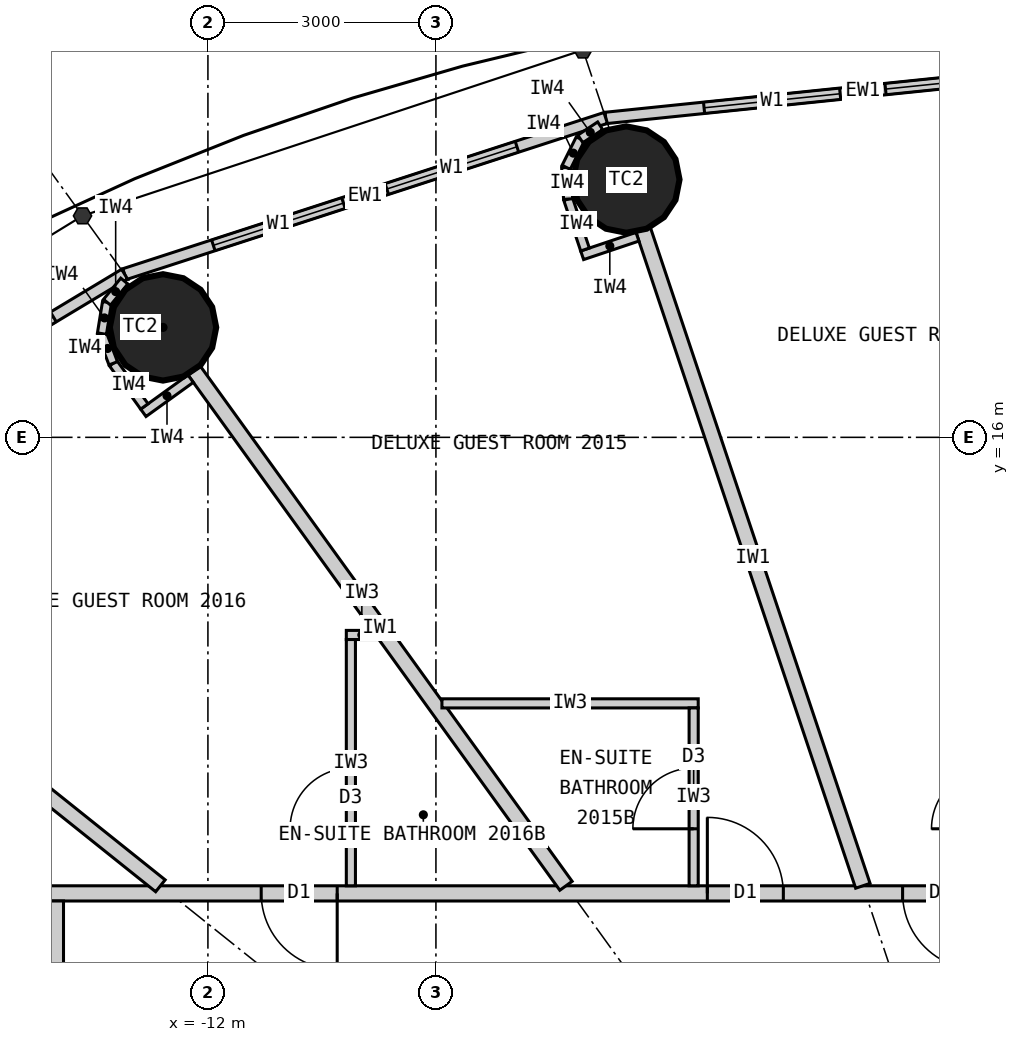
"""IFC4 building model, lengths in metres.
Left out: names, types, materials, properties, quantities, classifications, styles, units other than length and angle.
Written with IfcOpenShell. Run it as: python <this file> out.ifc"""

import sys

from ifc_helpers import new_model, si_unit, direction, frame, frame_2d, origin, origin_2d, place, context, subcontext, project, spatial, rectangle, circle, extrude, element, fill, save


model = new_model("IFC4")
c1 = context("Model", 3, precision=1e-05, world=origin(), true_north=direction((0.0, 1.0)))
c2 = subcontext(c1, "Body", "Model", "MODEL_VIEW")
j1 = project(units=[si_unit("LENGTHUNIT", "METRE"), si_unit("PLANEANGLEUNIT", "RADIAN")], contexts=[c1])
p1 = place(None, origin())
s1 = spatial("IfcSite", under=j1, at=p1, CompositionType="ELEMENT")
p2 = place(p1, origin())
s2 = spatial("IfcBuilding", under=s1, at=p2, CompositionType="ELEMENT")
p3 = place(p2, frame((0.0, 0.0, 80.4)))
s3 = spatial("IfcBuildingStorey", under=s2, at=p3, CompositionType="ELEMENT", Elevation=80.4)
for number, where, z_axis, x_axis in (
    (1, (-6.495, 19.391, 0.0), (0.0, 0.0, 1.0), (1.0, 0.0, 0.0)),
    (2, (-12.591, 17.447, 0.0), (0.0, 0.0, 1.0), (1.0, 0.0, 0.0)),
):
    element("IfcColumn", number, at=place(p3, frame(where, z_axis=z_axis, x_axis=x_axis)), inside=s3, PredefinedType="COLUMN", context=c2, shape_type="SweptSolid", body=[
        extrude(circle(Radius=0.7, at=origin_2d()), origin(), (0.0, 0.0, 1.0), 3.3),
    ])
p4 = place(p3, frame((0.0, 20.9, 0.0), z_axis=(0.0, 0.0, 1.0), x_axis=(-0.994721394369, -0.102612609291, 0.0)))
e3 = element("IfcWall", 3, at=p4, inside=s3, PredefinedType="ELEMENTEDWALL", context=c2, shape_type="SweptSolid", body=[
    extrude(rectangle(XDim=6.802, YDim=0.15, at=frame_2d((3.401, 0.0))), origin(), (0.0, 0.0, 1.0), 3.12),
])
p5 = place(p4, frame((1.301, 0.0, 0.9)))
e4 = element("IfcOpeningElement", 4, at=p5, cuts=e3, PredefinedType="OPENING", context=c2, shape_type="SweptSolid", body=[
    extrude(rectangle(XDim=1.8, YDim=1.9, at=frame_2d((0.9, 0.95))), frame((0.0, 0.085, 0.0), z_axis=(0.0, -1.0, 0.0), x_axis=(1.0, 0.0, 0.0)), (0.0, 0.0, 1.0), 0.17),
])
p6 = place(p4, frame((3.701, 0.0, 0.9)))
e5 = element("IfcOpeningElement", 5, at=p6, cuts=e3, PredefinedType="OPENING", context=c2, shape_type="SweptSolid", body=[
    extrude(rectangle(XDim=1.8, YDim=1.9, at=frame_2d((0.9, 0.95))), frame((0.0, 0.085, 0.0), z_axis=(0.0, -1.0, 0.0), x_axis=(1.0, 0.0, 0.0)), (0.0, 0.0, 1.0), 0.17),
])
p7 = place(p3, frame((-6.766, 20.202, 0.0), z_axis=(0.0, 0.0, 1.0), x_axis=(-0.951137534625, -0.308767534285, 0.0)))
e6 = element("IfcWall", 6, at=p7, inside=s3, PredefinedType="ELEMENTEDWALL", context=c2, shape_type="SweptSolid", body=[
    extrude(rectangle(XDim=6.655, YDim=0.15, at=frame_2d((3.328, 0.0))), origin(), (0.0, 0.0, 1.0), 3.12),
])
p8 = place(p7, frame((1.228, 0.0, 0.9)))
e7 = element("IfcOpeningElement", 7, at=p8, cuts=e6, PredefinedType="OPENING", context=c2, shape_type="SweptSolid", body=[
    extrude(rectangle(XDim=1.8, YDim=1.9, at=frame_2d((0.9, 0.95))), frame((0.0, 0.085, 0.0), z_axis=(0.0, -1.0, 0.0), x_axis=(1.0, 0.0, 0.0)), (0.0, 0.0, 1.0), 0.17),
])
p9 = place(p7, frame((3.628, 0.0, 0.9)))
e8 = element("IfcOpeningElement", 8, at=p9, cuts=e6, PredefinedType="OPENING", context=c2, shape_type="SweptSolid", body=[
    extrude(rectangle(XDim=1.8, YDim=1.9, at=frame_2d((0.9, 0.95))), frame((0.0, 0.085, 0.0), z_axis=(0.0, -1.0, 0.0), x_axis=(1.0, 0.0, 0.0)), (0.0, 0.0, 1.0), 0.17),
])
p10 = place(p3, frame((-13.096, 18.147, 0.0), z_axis=(0.0, 0.0, 1.0), x_axis=(-0.856983180864, -0.515344377787, 0.0)))
e9 = element("IfcWall", 9, at=p10, inside=s3, PredefinedType="ELEMENTEDWALL", context=c2, shape_type="SweptSolid", body=[
    extrude(rectangle(XDim=6.386, YDim=0.15, at=frame_2d((3.193, 0.0))), origin(), (0.0, 0.0, 1.0), 3.12),
])
p11 = place(p10, frame((1.093, 0.0, 0.9)))
e10 = element("IfcOpeningElement", 10, at=p11, cuts=e9, PredefinedType="OPENING", context=c2, shape_type="SweptSolid", body=[
    extrude(rectangle(XDim=1.8, YDim=1.9, at=frame_2d((0.9, 0.95))), frame((0.0, 0.085, 0.0), z_axis=(0.0, -1.0, 0.0), x_axis=(1.0, 0.0, 0.0)), (0.0, 0.0, 1.0), 0.17),
])
p12 = place(p10, frame((3.493, 0.0, 0.9)))
e11 = element("IfcOpeningElement", 11, at=p12, cuts=e9, PredefinedType="OPENING", context=c2, shape_type="SweptSolid", body=[
    extrude(rectangle(XDim=1.8, YDim=1.9, at=frame_2d((0.9, 0.95))), frame((0.0, 0.085, 0.0), z_axis=(0.0, -1.0, 0.0), x_axis=(1.0, 0.0, 0.0)), (0.0, 0.0, 1.0), 0.17),
])
p13 = place(p3, frame((-14.1, 10.0, 0.0), z_axis=(0.0, 0.0, 1.0), x_axis=(1.0, 0.0, 0.0)))
e12 = element("IfcWall", 12, at=p13, inside=s3, PredefinedType="PARTITIONING", context=c2, shape_type="SweptSolid", body=[
    extrude(rectangle(XDim=28.2, YDim=0.2, at=frame_2d((14.1, 0.0))), origin(), (0.0, 0.0, 1.0), 3.12),
])
p14 = place(p13, frame((23.865, 0.0, 0.0)))
e13 = element("IfcOpeningElement", 13, at=p14, cuts=e12, PredefinedType="OPENING", context=c2, shape_type="SweptSolid", body=[
    extrude(rectangle(XDim=1.0, YDim=2.2, at=frame_2d((0.5, 1.1))), frame((0.0, 0.11, 0.0), z_axis=(0.0, -1.0, 0.0), x_axis=(1.0, 0.0, 0.0)), (0.0, 0.0, 1.0), 0.22),
])
p15 = place(p13, frame((18.529, 0.0, 0.0)))
e14 = element("IfcOpeningElement", 14, at=p15, cuts=e12, PredefinedType="OPENING", context=c2, shape_type="SweptSolid", body=[
    extrude(rectangle(XDim=1.0, YDim=2.2, at=frame_2d((0.5, 1.1))), frame((0.0, 0.11, 0.0), z_axis=(0.0, -1.0, 0.0), x_axis=(1.0, 0.0, 0.0)), (0.0, 0.0, 1.0), 0.22),
])
p16 = place(p13, frame((14.623, 0.0, 0.0)))
e15 = element("IfcOpeningElement", 15, at=p16, cuts=e12, PredefinedType="OPENING", context=c2, shape_type="SweptSolid", body=[
    extrude(rectangle(XDim=1.0, YDim=2.2, at=frame_2d((0.5, 1.1))), frame((0.0, 0.11, 0.0), z_axis=(0.0, -1.0, 0.0), x_axis=(1.0, 0.0, 0.0)), (0.0, 0.0, 1.0), 0.22),
])
p17 = place(p13, frame((11.24, 0.0, 0.0)))
e16 = element("IfcOpeningElement", 16, at=p17, cuts=e12, PredefinedType="OPENING", context=c2, shape_type="SweptSolid", body=[
    extrude(rectangle(XDim=1.0, YDim=2.2, at=frame_2d((0.5, 1.1))), frame((0.0, 0.11, 0.0), z_axis=(0.0, -1.0, 0.0), x_axis=(1.0, 0.0, 0.0)), (0.0, 0.0, 1.0), 0.22),
])
p18 = place(p13, frame((8.671, 0.0, 0.0)))
e17 = element("IfcOpeningElement", 17, at=p18, cuts=e12, PredefinedType="OPENING", context=c2, shape_type="SweptSolid", body=[
    extrude(rectangle(XDim=1.0, YDim=2.2, at=frame_2d((0.5, 1.1))), frame((0.0, 0.11, 0.0), z_axis=(0.0, -1.0, 0.0), x_axis=(1.0, 0.0, 0.0)), (0.0, 0.0, 1.0), 0.22),
])
p19 = place(p13, frame((2.801, 0.0, 0.0)))
e18 = element("IfcOpeningElement", 18, at=p19, cuts=e12, PredefinedType="OPENING", context=c2, shape_type="SweptSolid", body=[
    extrude(rectangle(XDim=1.0, YDim=2.2, at=frame_2d((0.5, 1.1))), frame((0.0, 0.11, 0.0), z_axis=(0.0, -1.0, 0.0), x_axis=(1.0, 0.0, 0.0)), (0.0, 0.0, 1.0), 0.22),
])
p20 = place(p3, frame((-14.0, 9.9, 0.0), z_axis=(0.0, 0.0, 1.0), x_axis=(0.0, -1.0, 0.0)))
e19 = element("IfcWall", 19, at=p20, inside=s3, PredefinedType="PARTITIONING", context=c2, shape_type="SweptSolid", body=[
    extrude(rectangle(XDim=19.8, YDim=0.2, at=frame_2d((9.9, 0.0))), origin(), (0.0, 0.0, 1.0), 3.12),
])
p21 = place(p20, frame((7.097, 0.0, 0.0)))
e20 = element("IfcOpeningElement", 20, at=p21, cuts=e19, PredefinedType="OPENING", context=c2, shape_type="SweptSolid", body=[
    extrude(rectangle(XDim=1.0, YDim=2.2, at=frame_2d((0.5, 1.1))), frame((0.0, 0.11, 0.0), z_axis=(0.0, -1.0, 0.0), x_axis=(1.0, 0.0, 0.0)), (0.0, 0.0, 1.0), 0.22),
])
p22 = place(p20, frame((10.778, 0.0, 0.0)))
e21 = element("IfcOpeningElement", 21, at=p22, cuts=e19, PredefinedType="OPENING", context=c2, shape_type="SweptSolid", body=[
    extrude(rectangle(XDim=1.0, YDim=2.2, at=frame_2d((0.5, 1.1))), frame((0.0, 0.11, 0.0), z_axis=(0.0, -1.0, 0.0), x_axis=(1.0, 0.0, 0.0)), (0.0, 0.0, 1.0), 0.22),
])
p23 = place(p20, frame((13.552, 0.0, 0.0)))
e22 = element("IfcOpeningElement", 22, at=p23, cuts=e19, PredefinedType="OPENING", context=c2, shape_type="SweptSolid", body=[
    extrude(rectangle(XDim=1.0, YDim=2.2, at=frame_2d((0.5, 1.1))), frame((0.0, 0.11, 0.0), z_axis=(0.0, -1.0, 0.0), x_axis=(1.0, 0.0, 0.0)), (0.0, 0.0, 1.0), 0.22),
])
p24 = place(p20, frame((18.698, 0.0, 0.0)))
e23 = element("IfcOpeningElement", 23, at=p24, cuts=e19, PredefinedType="OPENING", context=c2, shape_type="SweptSolid", body=[
    extrude(rectangle(XDim=1.0, YDim=2.2, at=frame_2d((0.5, 1.1))), frame((0.0, 0.11, 0.0), z_axis=(0.0, -1.0, 0.0), x_axis=(1.0, 0.0, 0.0)), (0.0, 0.0, 1.0), 0.22),
])
p25 = place(p20, frame((1.877, 0.0, 0.0)))
e24 = element("IfcOpeningElement", 24, at=p25, cuts=e19, PredefinedType="OPENING", context=c2, shape_type="SweptSolid", body=[
    extrude(rectangle(XDim=1.0, YDim=2.2, at=frame_2d((0.5, 1.1))), frame((0.0, 0.11, 0.0), z_axis=(0.0, -1.0, 0.0), x_axis=(1.0, 0.0, 0.0)), (0.0, 0.0, 1.0), 0.22),
])
p26 = place(p3, frame((-3.383, 10.1, 0.0), z_axis=(0.0, 0.0, 1.0), x_axis=(-0.31759592231, 0.948226149256, 0.0)))
e25 = element("IfcWall", 25, at=p26, inside=s3, PredefinedType="PARTITIONING", context=c2, shape_type="SweptSolid", body=[
    extrude(rectangle(XDim=9.098, YDim=0.2, at=frame_2d((4.549, 0.0))), origin(), (0.0, 0.0, 1.0), 2.32),
])
p27 = place(p3, frame((-7.289, 10.1, 0.0), z_axis=(0.0, 0.0, 1.0), x_axis=(-0.585198353053, 0.810890182197, 0.0)))
e26 = element("IfcWall", 26, at=p27, inside=s3, PredefinedType="PARTITIONING", context=c2, shape_type="SweptSolid", body=[
    extrude(rectangle(XDim=8.36, YDim=0.2, at=frame_2d((4.18, 0.0))), origin(), (0.0, 0.0, 1.0), 2.32),
])
p28 = place(p3, frame((-12.625, 10.1, 0.0), z_axis=(0.0, 0.0, 1.0), x_axis=(-0.780892451574, 0.624665493744, 0.0)))
e27 = element("IfcWall", 27, at=p28, inside=s3, PredefinedType="PARTITIONING", context=c2, shape_type="SweptSolid", body=[
    extrude(rectangle(XDim=6.045, YDim=0.2, at=frame_2d((3.022, 0.0))), origin(), (0.0, 0.0, 1.0), 2.32),
])
p29 = place(p3, frame((-8.921, 12.5, 0.0), z_axis=(0.0, 0.0, 1.0), x_axis=(1.0, 0.0, 0.0)))
e28 = element("IfcWall", 28, at=p29, inside=s3, PredefinedType="PARTITIONING", context=c2, shape_type="SweptSolid", body=[
    extrude(rectangle(XDim=3.372, YDim=0.12, at=frame_2d((1.686, 0.0))), origin(), (0.0, 0.0, 1.0), 3.12),
])
p30 = place(p3, frame((-5.609, 10.1, 0.0), z_axis=(0.0, 0.0, 1.0), x_axis=(0.0, 1.0, 0.0)))
e29 = element("IfcWall", 29, at=p30, inside=s3, PredefinedType="PARTITIONING", context=c2, shape_type="SweptSolid", body=[
    extrude(rectangle(XDim=2.34, YDim=0.12, at=frame_2d((1.17, 0.0))), origin(), (0.0, 0.0, 1.0), 3.12),
])
p31 = place(p30, frame((0.75, 0.0, 0.0)))
e30 = element("IfcOpeningElement", 30, at=p31, cuts=e29, PredefinedType="OPENING", context=c2, shape_type="SweptSolid", body=[
    extrude(rectangle(XDim=0.8, YDim=2.1, at=frame_2d((0.4, 1.05))), frame((0.0, 0.07, 0.0), z_axis=(0.0, -1.0, 0.0), x_axis=(1.0, 0.0, 0.0)), (0.0, 0.0, 1.0), 0.14),
])
p32 = place(p3, frame((-9.771, 13.4, 0.0), z_axis=(0.0, 0.0, 1.0), x_axis=(-1.0, 0.0, 0.0)))
e31 = element("IfcWall", 31, at=p32, inside=s3, PredefinedType="PARTITIONING", context=c2, shape_type="SweptSolid", body=[
    extrude(rectangle(XDim=0.408, YDim=0.12, at=frame_2d((0.204, 0.0))), origin(), (0.0, 0.0, 1.0), 3.12),
])
p33 = place(p3, frame((-10.119, 10.1, 0.0), z_axis=(0.0, 0.0, 1.0), x_axis=(0.0, 1.0, 0.0)))
e32 = element("IfcWall", 32, at=p33, inside=s3, PredefinedType="PARTITIONING", context=c2, shape_type="SweptSolid", body=[
    extrude(rectangle(XDim=3.24, YDim=0.12, at=frame_2d((1.62, 0.0))), origin(), (0.0, 0.0, 1.0), 3.12),
])
p34 = place(p33, frame((0.75, 0.0, 0.0)))
e33 = element("IfcOpeningElement", 33, at=p34, cuts=e32, PredefinedType="OPENING", context=c2, shape_type="SweptSolid", body=[
    extrude(rectangle(XDim=0.8, YDim=2.1, at=frame_2d((0.4, 1.05))), frame((0.0, 0.07, 0.0), z_axis=(0.0, -1.0, 0.0), x_axis=(1.0, 0.0, 0.0)), (0.0, 0.0, 1.0), 0.14),
])
p35 = place(p3, frame((-6.348, 18.639, 0.0), z_axis=(0.0, 0.0, 1.0), x_axis=(-0.948268951266, -0.317468102437, 0.0)))
e34 = element("IfcWall", 34, at=p35, inside=s3, PredefinedType="PARTITIONING", context=c2, shape_type="SweptSolid", body=[
    extrude(rectangle(XDim=0.768, YDim=0.12, at=frame_2d((0.384, 0.0))), origin(), (0.0, 0.0, 1.0), 3.12),
])
p36 = place(p3, frame((-7.038, 18.471, 0.0), z_axis=(0.0, 0.0, 1.0), x_axis=(-0.317378466199, 0.9482989556, 0.0)))
e35 = element("IfcWall", 35, at=p36, inside=s3, PredefinedType="PARTITIONING", context=c2, shape_type="SweptSolid", body=[
    extrude(rectangle(XDim=0.7, YDim=0.12, at=frame_2d((0.35, 0.0))), origin(), (0.0, 0.0, 1.0), 3.12),
])
p37 = place(p3, frame((-7.26, 19.135, 0.0), z_axis=(0.0, 0.0, 1.0), x_axis=(-0.0613238046, 0.99811792439, 0.0)))
e36 = element("IfcWall", 36, at=p37, inside=s3, PredefinedType="PARTITIONING", context=c2, shape_type="SweptSolid", body=[
    extrude(rectangle(XDim=0.418, YDim=0.12, at=frame_2d((0.209, 0.0))), origin(), (0.0, 0.0, 1.0), 3.12),
])
p38 = place(p3, frame((-7.286, 19.552, 0.0), z_axis=(0.0, 0.0, 1.0), x_axis=(0.445810757773, 0.89512723579, 0.0)))
e37 = element("IfcWall", 37, at=p38, inside=s3, PredefinedType="PARTITIONING", context=c2, shape_type="SweptSolid", body=[
    extrude(rectangle(XDim=0.418, YDim=0.12, at=frame_2d((0.209, 0.0))), origin(), (0.0, 0.0, 1.0), 3.12),
])
p39 = place(p3, frame((-7.1, 19.926, 0.0), z_axis=(0.0, 0.0, 1.0), x_axis=(0.833488262509, 0.552537162787, 0.0)))
e38 = element("IfcWall", 38, at=p39, inside=s3, PredefinedType="PARTITIONING", context=c2, shape_type="SweptSolid", body=[
    extrude(rectangle(XDim=0.313, YDim=0.12, at=frame_2d((0.156, 0.0))), origin(), (0.0, 0.0, 1.0), 3.12),
])
p40 = place(p3, frame((-12.227, 16.772, 0.0), z_axis=(0.0, 0.0, 1.0), x_axis=(-0.810821798253, -0.585293098778, 0.0)))
e39 = element("IfcWall", 39, at=p40, inside=s3, PredefinedType="PARTITIONING", context=c2, shape_type="SweptSolid", body=[
    extrude(rectangle(XDim=0.768, YDim=0.12, at=frame_2d((0.384, 0.0))), origin(), (0.0, 0.0, 1.0), 3.12),
])
p41 = place(p3, frame((-12.836, 16.406, 0.0), z_axis=(0.0, 0.0, 1.0), x_axis=(-0.585223113993, 0.810872312296, 0.0)))
e40 = element("IfcWall", 40, at=p41, inside=s3, PredefinedType="PARTITIONING", context=c2, shape_type="SweptSolid", body=[
    extrude(rectangle(XDim=0.7, YDim=0.12, at=frame_2d((0.35, 0.0))), origin(), (0.0, 0.0, 1.0), 3.12),
])
p42 = place(p3, frame((-13.246, 16.974, 0.0), z_axis=(0.0, 0.0, 1.0), x_axis=(-0.355728122235, 0.934589483705, 0.0)))
e41 = element("IfcWall", 41, at=p42, inside=s3, PredefinedType="PARTITIONING", context=c2, shape_type="SweptSolid", body=[
    extrude(rectangle(XDim=0.418, YDim=0.12, at=frame_2d((0.209, 0.0))), origin(), (0.0, 0.0, 1.0), 3.12),
])
p43 = place(p3, frame((-13.394, 17.365, 0.0), z_axis=(0.0, 0.0, 1.0), x_axis=(0.159379276926, 0.987217425943, 0.0)))
e42 = element("IfcWall", 42, at=p43, inside=s3, PredefinedType="PARTITIONING", context=c2, shape_type="SweptSolid", body=[
    extrude(rectangle(XDim=0.418, YDim=0.12, at=frame_2d((0.209, 0.0))), origin(), (0.0, 0.0, 1.0), 3.12),
])
p44 = place(p3, frame((-13.328, 17.777, 0.0), z_axis=(0.0, 0.0, 1.0), x_axis=(0.632276783541, 0.774742582407, 0.0)))
e43 = element("IfcWall", 43, at=p44, inside=s3, PredefinedType="PARTITIONING", context=c2, shape_type="SweptSolid", body=[
    extrude(rectangle(XDim=0.36, YDim=0.12, at=frame_2d((0.18, 0.0))), origin(), (0.0, 0.0, 1.0), 3.12),
])
p45 = place(p5, origin())
e44 = element("IfcWindow", 44, at=p45, inside=s3, PartitioningType="SINGLE_PANEL", PredefinedType="WINDOW", context=c2, shape_type="SweptSolid", body=[
    extrude(rectangle(XDim=1.8, YDim=1.9, at=frame_2d((0.9, 0.95))), frame((0.0, 0.03, 0.0), z_axis=(0.0, -1.0, 0.0), x_axis=(1.0, 0.0, 0.0)), (0.0, 0.0, 1.0), 0.06),
])
fill(e4, e44)
p46 = place(p6, origin())
e45 = element("IfcWindow", 45, at=p46, inside=s3, PartitioningType="SINGLE_PANEL", PredefinedType="WINDOW", context=c2, shape_type="SweptSolid", body=[
    extrude(rectangle(XDim=1.8, YDim=1.9, at=frame_2d((0.9, 0.95))), frame((0.0, 0.03, 0.0), z_axis=(0.0, -1.0, 0.0), x_axis=(1.0, 0.0, 0.0)), (0.0, 0.0, 1.0), 0.06),
])
fill(e5, e45)
p47 = place(p8, origin())
e46 = element("IfcWindow", 46, at=p47, inside=s3, PartitioningType="SINGLE_PANEL", PredefinedType="WINDOW", context=c2, shape_type="SweptSolid", body=[
    extrude(rectangle(XDim=1.8, YDim=1.9, at=frame_2d((0.9, 0.95))), frame((0.0, 0.03, 0.0), z_axis=(0.0, -1.0, 0.0), x_axis=(1.0, 0.0, 0.0)), (0.0, 0.0, 1.0), 0.06),
])
fill(e7, e46)
p48 = place(p9, origin())
e47 = element("IfcWindow", 47, at=p48, inside=s3, PartitioningType="SINGLE_PANEL", PredefinedType="WINDOW", context=c2, shape_type="SweptSolid", body=[
    extrude(rectangle(XDim=1.8, YDim=1.9, at=frame_2d((0.9, 0.95))), frame((0.0, 0.03, 0.0), z_axis=(0.0, -1.0, 0.0), x_axis=(1.0, 0.0, 0.0)), (0.0, 0.0, 1.0), 0.06),
])
fill(e8, e47)
p49 = place(p11, origin())
e48 = element("IfcWindow", 48, at=p49, inside=s3, PartitioningType="SINGLE_PANEL", PredefinedType="WINDOW", context=c2, shape_type="SweptSolid", body=[
    extrude(rectangle(XDim=1.8, YDim=1.9, at=frame_2d((0.9, 0.95))), frame((0.0, 0.03, 0.0), z_axis=(0.0, -1.0, 0.0), x_axis=(1.0, 0.0, 0.0)), (0.0, 0.0, 1.0), 0.06),
])
fill(e10, e48)
p50 = place(p17, origin())
e49 = element("IfcDoor", 49, at=p50, inside=s3, OperationType="SINGLE_SWING_RIGHT", PredefinedType="DOOR", context=c2, shape_type="SweptSolid", body=[
    extrude(rectangle(XDim=1.0, YDim=2.2, at=frame_2d((0.5, 1.1))), frame((0.0, 0.025, 0.0), z_axis=(0.0, -1.0, 0.0), x_axis=(1.0, 0.0, 0.0)), (0.0, 0.0, 1.0), 0.05),
])
fill(e16, e49)
p51 = place(p31, origin())
e50 = element("IfcDoor", 50, at=p51, inside=s3, OperationType="SINGLE_SWING_LEFT", PredefinedType="DOOR", context=c2, shape_type="SweptSolid", body=[
    extrude(rectangle(XDim=0.8, YDim=2.1, at=frame_2d((0.4, 1.05))), frame((0.0, 0.025, 0.0), z_axis=(0.0, -1.0, 0.0), x_axis=(1.0, 0.0, 0.0)), (0.0, 0.0, 1.0), 0.05),
])
fill(e30, e50)
p52 = place(p18, origin())
e51 = element("IfcDoor", 51, at=p52, inside=s3, OperationType="SINGLE_SWING_LEFT", PredefinedType="DOOR", context=c2, shape_type="SweptSolid", body=[
    extrude(rectangle(XDim=1.0, YDim=2.2, at=frame_2d((0.5, 1.1))), frame((0.0, 0.025, 0.0), z_axis=(0.0, -1.0, 0.0), x_axis=(1.0, 0.0, 0.0)), (0.0, 0.0, 1.0), 0.05),
])
fill(e17, e51)
p53 = place(p34, origin())
e52 = element("IfcDoor", 52, at=p53, inside=s3, OperationType="SINGLE_SWING_LEFT", PredefinedType="DOOR", context=c2, shape_type="SweptSolid", body=[
    extrude(rectangle(XDim=0.8, YDim=2.1, at=frame_2d((0.4, 1.05))), frame((0.0, 0.025, 0.0), z_axis=(0.0, -1.0, 0.0), x_axis=(1.0, 0.0, 0.0)), (0.0, 0.0, 1.0), 0.05),
])
fill(e33, e52)
p54 = place(p19, origin())
e53 = element("IfcDoor", 53, at=p54, inside=s3, OperationType="SINGLE_SWING_RIGHT", PredefinedType="DOOR", context=c2, shape_type="SweptSolid", body=[
    extrude(rectangle(XDim=1.0, YDim=2.2, at=frame_2d((0.5, 1.1))), frame((0.0, 0.025, 0.0), z_axis=(0.0, -1.0, 0.0), x_axis=(1.0, 0.0, 0.0)), (0.0, 0.0, 1.0), 0.05),
])
fill(e18, e53)
save(model, sys.argv[1])
